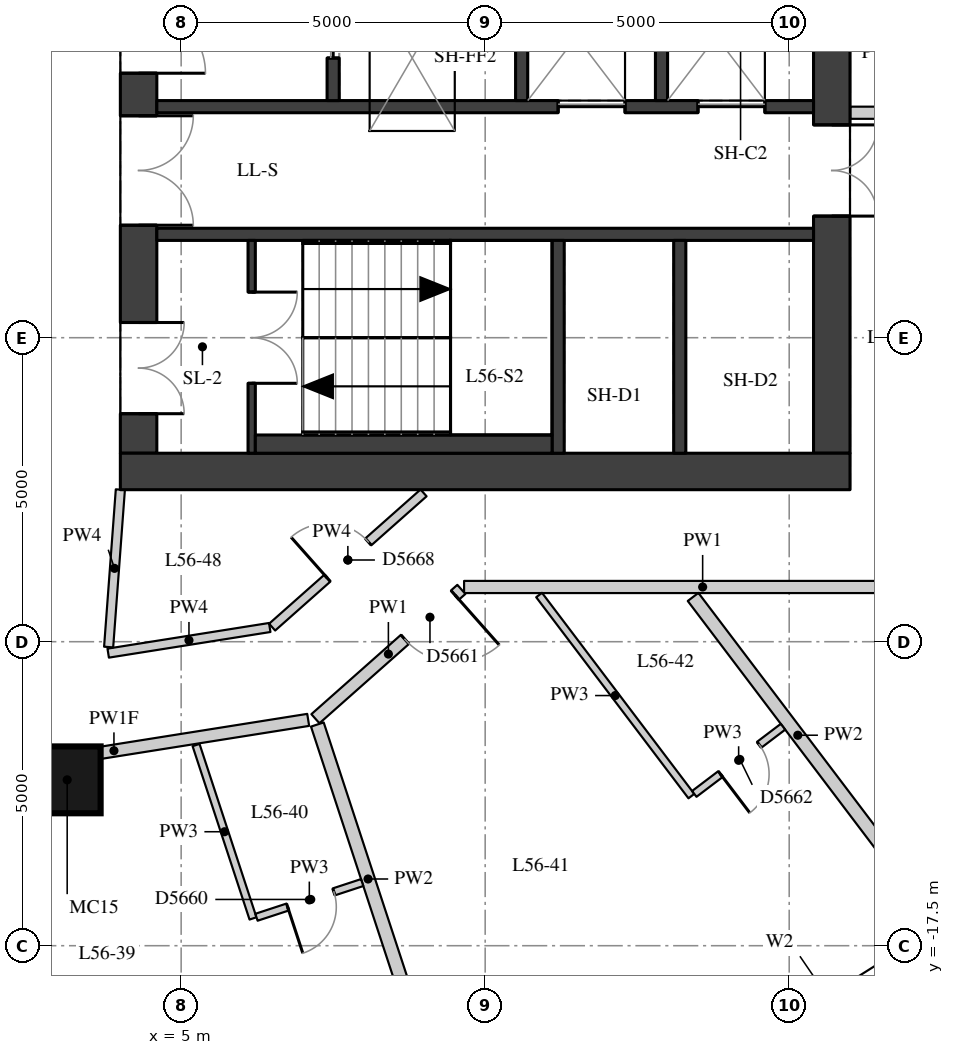
"""IFC4 building model, lengths in metres.
Left out: names, types, materials, properties, quantities, classifications, styles, units other than length and angle.
Written with IfcOpenShell. Run it as: python <this file> out.ifc"""

import sys

from ifc_helpers import new_model, si_unit, direction, frame, frame_2d, origin, origin_2d, place, context, subcontext, project, spatial, rectangle, extrude, element, fill, save


model = new_model("IFC4")
c1 = context("Model", 3, precision=1e-05, world=origin(), true_north=direction((0.0, 1.0)))
c2 = subcontext(c1, "Body", "Model", "MODEL_VIEW")
j1 = project(units=[si_unit("LENGTHUNIT", "METRE"), si_unit("PLANEANGLEUNIT", "RADIAN")], contexts=[c1])
p1 = place(None, origin())
s1 = spatial("IfcSite", under=j1, at=p1, CompositionType="ELEMENT")
p2 = place(p1, origin())
s2 = spatial("IfcBuilding", under=s1, at=p2, CompositionType="ELEMENT")
p3 = place(p2, frame((0.0, 0.0, 199.1)))
s3 = spatial("IfcBuildingStorey", under=s2, at=p3, CompositionType="ELEMENT", Elevation=199.1)
p4 = place(p3, frame((3.126, -14.772, 0.0), z_axis=(0.0, 0.0, 1.0), x_axis=(1.0, 0.0, 0.0)))
e1 = element("IfcColumn", 1, at=p4, inside=s3, PredefinedType="COLUMN", context=c2, shape_type="SweptSolid", body=[
    extrude(rectangle(XDim=1.1, YDim=1.1, at=origin_2d()), origin(), (0.0, 0.0, 1.0), 3.3),
])
p5 = place(p3, frame((14.232, -19.47, 0.0), z_axis=(0.0, 0.0, 1.0), x_axis=(0.84614984472, 0.532945063098, 0.0)))
e2 = element("IfcWall", 2, at=p5, inside=s3, PredefinedType="SOLIDWALL", context=c2, shape_type="SweptSolid", body=[
    extrude(rectangle(XDim=3.586, YDim=0.45, at=frame_2d((1.793, 0.0))), origin(), (0.0, 0.0, 1.0), 3.02),
])
p6 = place(p5, frame((0.793, 0.0, 0.4)))
e3 = element("IfcOpeningElement", 3, at=p6, cuts=e2, PredefinedType="OPENING", context=c2, shape_type="SweptSolid", body=[
    extrude(rectangle(XDim=2.0, YDim=1.75, at=frame_2d((1.0, 0.875))), frame((0.0, 0.235, 0.0), z_axis=(0.0, -1.0, 0.0), x_axis=(1.0, 0.0, 0.0)), (0.0, 0.0, 1.0), 0.47),
])
p7 = place(p3, frame((4.3, -9.4, 0.0), z_axis=(0.0, 0.0, 1.0), x_axis=(0.0, 1.0, 0.0)))
e4 = element("IfcWall", 4, at=p7, inside=s3, PredefinedType="SHEAR", context=c2, shape_type="SweptSolid", body=[
    extrude(rectangle(XDim=18.8, YDim=0.6, at=frame_2d((9.4, 0.0))), origin(), (0.0, 0.0, 1.0), 3.02),
])
p8 = place(p7, frame((0.65, 0.0, 0.0)))
e5 = element("IfcOpeningElement", 5, at=p8, cuts=e4, PredefinedType="OPENING", context=c2, shape_type="SweptSolid", body=[
    extrude(rectangle(XDim=1.5, YDim=2.1, at=frame_2d((0.75, 1.05))), frame((0.0, 0.31, 0.0), z_axis=(0.0, -1.0, 0.0), x_axis=(1.0, 0.0, 0.0)), (0.0, 0.0, 1.0), 0.62),
])
p9 = place(p7, frame((3.75, 0.0, 0.0)))
e6 = element("IfcOpeningElement", 6, at=p9, cuts=e4, PredefinedType="OPENING", context=c2, shape_type="SweptSolid", body=[
    extrude(rectangle(XDim=1.8, YDim=2.1, at=frame_2d((0.9, 1.05))), frame((0.0, 0.31, 0.0), z_axis=(0.0, -1.0, 0.0), x_axis=(1.0, 0.0, 0.0)), (0.0, 0.0, 1.0), 0.62),
])
p10 = place(p7, frame((6.25, 0.0, 0.0)))
e7 = element("IfcOpeningElement", 7, at=p10, cuts=e4, PredefinedType="OPENING", context=c2, shape_type="SweptSolid", body=[
    extrude(rectangle(XDim=1.1, YDim=2.1, at=frame_2d((0.55, 1.05))), frame((0.0, 0.31, 0.0), z_axis=(0.0, -1.0, 0.0), x_axis=(1.0, 0.0, 0.0)), (0.0, 0.0, 1.0), 0.62),
])
p11 = place(p7, frame((8.9, 0.0, 0.0)))
e8 = element("IfcOpeningElement", 8, at=p11, cuts=e4, PredefinedType="OPENING", context=c2, shape_type="SweptSolid", body=[
    extrude(rectangle(XDim=1.0, YDim=2.1, at=frame_2d((0.5, 1.05))), frame((0.0, 0.31, 0.0), z_axis=(0.0, -1.0, 0.0), x_axis=(1.0, 0.0, 0.0)), (0.0, 0.0, 1.0), 0.62),
])
p12 = place(p7, frame((11.45, 0.0, 0.0)))
e9 = element("IfcOpeningElement", 9, at=p12, cuts=e4, PredefinedType="OPENING", context=c2, shape_type="SweptSolid", body=[
    extrude(rectangle(XDim=1.1, YDim=2.1, at=frame_2d((0.55, 1.05))), frame((0.0, 0.31, 0.0), z_axis=(0.0, -1.0, 0.0), x_axis=(1.0, 0.0, 0.0)), (0.0, 0.0, 1.0), 0.62),
])
p13 = place(p7, frame((13.25, 0.0, 0.0)))
e10 = element("IfcOpeningElement", 10, at=p13, cuts=e4, PredefinedType="OPENING", context=c2, shape_type="SweptSolid", body=[
    extrude(rectangle(XDim=1.8, YDim=2.1, at=frame_2d((0.9, 1.05))), frame((0.0, 0.31, 0.0), z_axis=(0.0, -1.0, 0.0), x_axis=(1.0, 0.0, 0.0)), (0.0, 0.0, 1.0), 0.62),
])
p14 = place(p7, frame((16.65, 0.0, 0.0)))
e11 = element("IfcOpeningElement", 11, at=p14, cuts=e4, PredefinedType="OPENING", context=c2, shape_type="SweptSolid", body=[
    extrude(rectangle(XDim=1.5, YDim=2.1, at=frame_2d((0.75, 1.05))), frame((0.0, 0.31, 0.0), z_axis=(0.0, -1.0, 0.0), x_axis=(1.0, 0.0, 0.0)), (0.0, 0.0, 1.0), 0.62),
])
p15 = place(p3, frame((15.7, -9.4, 0.0), z_axis=(0.0, 0.0, 1.0), x_axis=(0.0, 1.0, 0.0)))
e12 = element("IfcWall", 12, at=p15, inside=s3, PredefinedType="SHEAR", context=c2, shape_type="SweptSolid", body=[
    extrude(rectangle(XDim=18.8, YDim=0.6, at=frame_2d((9.4, 0.0))), origin(), (0.0, 0.0, 1.0), 3.02),
])
p16 = place(p15, frame((13.4, 0.0, 0.0)))
e13 = element("IfcOpeningElement", 13, at=p16, cuts=e12, PredefinedType="OPENING", context=c2, shape_type="SweptSolid", body=[
    extrude(rectangle(XDim=1.5, YDim=2.1, at=frame_2d((0.75, 1.05))), frame((0.0, 0.31, 0.0), z_axis=(0.0, -1.0, 0.0), x_axis=(1.0, 0.0, 0.0)), (0.0, 0.0, 1.0), 0.62),
])
p17 = place(p15, frame((3.9, 0.0, 0.0)))
e14 = element("IfcOpeningElement", 14, at=p17, cuts=e12, PredefinedType="OPENING", context=c2, shape_type="SweptSolid", body=[
    extrude(rectangle(XDim=1.5, YDim=2.1, at=frame_2d((0.75, 1.05))), frame((0.0, 0.31, 0.0), z_axis=(0.0, -1.0, 0.0), x_axis=(1.0, 0.0, 0.0)), (0.0, 0.0, 1.0), 0.62),
])
p18 = place(p3, frame((4.0, -9.7, 0.0), z_axis=(0.0, 0.0, 1.0), x_axis=(1.0, 0.0, 0.0)))
e15 = element("IfcWall", 15, at=p18, inside=s3, PredefinedType="SHEAR", context=c2, shape_type="SweptSolid", body=[
    extrude(rectangle(XDim=12.0, YDim=0.6, at=frame_2d((6.0, 0.0))), origin(), (0.0, 0.0, 1.0), 3.02),
])
p19 = place(p3, frame((4.6, -3.7, 0.0), z_axis=(0.0, 0.0, 1.0), x_axis=(1.0, 0.0, 0.0)))
e16 = element("IfcWall", 16, at=p19, inside=s3, PredefinedType="SHEAR", context=c2, shape_type="SweptSolid", body=[
    extrude(rectangle(XDim=10.8, YDim=0.2, at=frame_2d((5.4, 0.0))), origin(), (0.0, 0.0, 1.0), 3.02),
])
p20 = place(p19, frame((6.6, 0.0, 0.0)))
e17 = element("IfcOpeningElement", 17, at=p20, cuts=e16, PredefinedType="OPENING", context=c2, shape_type="SweptSolid", body=[
    extrude(rectangle(XDim=1.1, YDim=2.1, at=frame_2d((0.55, 1.05))), frame((0.0, 0.11, 0.0), z_axis=(0.0, -1.0, 0.0), x_axis=(1.0, 0.0, 0.0)), (0.0, 0.0, 1.0), 0.22),
])
p21 = place(p19, frame((8.9, 0.0, 0.0)))
e18 = element("IfcOpeningElement", 18, at=p21, cuts=e16, PredefinedType="OPENING", context=c2, shape_type="SweptSolid", body=[
    extrude(rectangle(XDim=1.1, YDim=2.1, at=frame_2d((0.55, 1.05))), frame((0.0, 0.11, 0.0), z_axis=(0.0, -1.0, 0.0), x_axis=(1.0, 0.0, 0.0)), (0.0, 0.0, 1.0), 0.22),
])
p22 = place(p3, frame((4.6, -5.8, 0.0), z_axis=(0.0, 0.0, 1.0), x_axis=(1.0, 0.0, 0.0)))
e19 = element("IfcWall", 19, at=p22, inside=s3, PredefinedType="SHEAR", context=c2, shape_type="SweptSolid", body=[
    extrude(rectangle(XDim=10.8, YDim=0.2, at=frame_2d((5.4, 0.0))), origin(), (0.0, 0.0, 1.0), 3.02),
])
for number, where, z_axis, x_axis in (
    (20, (11.2, -9.4, 0.0), (0.0, 0.0, 1.0), (0.0, 1.0, 0.0)),
    (21, (13.2, -9.4, 0.0), (0.0, 0.0, 1.0), (0.0, 1.0, 0.0)),
):
    element("IfcWall", number, at=place(p3, frame(where, z_axis=z_axis, x_axis=x_axis)), inside=s3, PredefinedType="SHEAR", context=c2, shape_type="SweptSolid", body=[
        extrude(rectangle(XDim=3.5, YDim=0.2, at=frame_2d((1.75, 0.0))), origin(), (0.0, 0.0, 1.0), 3.02),
    ])
p23 = place(p3, frame((7.5, -3.6, 0.0), z_axis=(0.0, 0.0, 1.0), x_axis=(0.0, 1.0, 0.0)))
e22 = element("IfcWall", 22, at=p23, inside=s3, PredefinedType="SHEAR", context=c2, shape_type="SweptSolid", body=[
    extrude(rectangle(XDim=2.5, YDim=0.2, at=frame_2d((1.25, 0.0))), origin(), (0.0, 0.0, 1.0), 3.02),
])
p24 = place(p23, frame((0.7, 0.0, 0.0)))
e23 = element("IfcOpeningElement", 23, at=p24, cuts=e22, PredefinedType="OPENING", context=c2, shape_type="SweptSolid", body=[
    extrude(rectangle(XDim=1.1, YDim=2.1, at=frame_2d((0.55, 1.05))), frame((0.0, 0.11, 0.0), z_axis=(0.0, -1.0, 0.0), x_axis=(1.0, 0.0, 0.0)), (0.0, 0.0, 1.0), 0.22),
])
for number, where, z_axis, x_axis in (
    (24, (10.6, -3.6, 0.0), (0.0, 0.0, 1.0), (0.0, 1.0, 0.0)),
    (25, (12.9, -3.6, 0.0), (0.0, 0.0, 1.0), (0.0, 1.0, 0.0)),
):
    element("IfcWall", number, at=place(p3, frame(where, z_axis=z_axis, x_axis=x_axis)), inside=s3, PredefinedType="SHEAR", context=c2, shape_type="SweptSolid", body=[
        extrude(rectangle(XDim=2.5, YDim=0.2, at=frame_2d((1.25, 0.0))), origin(), (0.0, 0.0, 1.0), 3.02),
    ])
p25 = place(p3, frame((6.16, -9.4, 0.0), z_axis=(0.0, 0.0, 1.0), x_axis=(0.0, 1.0, 0.0)))
e26 = element("IfcWall", 26, at=p25, inside=s3, PredefinedType="SHEAR", context=c2, shape_type="SweptSolid", body=[
    extrude(rectangle(XDim=3.5, YDim=0.12, at=frame_2d((1.75, 0.0))), origin(), (0.0, 0.0, 1.0), 3.02),
])
p26 = place(p25, frame((1.15, 0.0, 0.0)))
e27 = element("IfcOpeningElement", 27, at=p26, cuts=e26, PredefinedType="OPENING", context=c2, shape_type="SweptSolid", body=[
    extrude(rectangle(XDim=1.5, YDim=2.1, at=frame_2d((0.75, 1.05))), frame((0.0, 0.07, 0.0), z_axis=(0.0, -1.0, 0.0), x_axis=(1.0, 0.0, 0.0)), (0.0, 0.0, 1.0), 0.14),
])
p27 = place(p3, frame((6.22, -9.25, 0.0), z_axis=(0.0, 0.0, 1.0), x_axis=(1.0, 0.0, 0.0)))
e28 = element("IfcWall", 28, at=p27, inside=s3, PredefinedType="PARTITIONING", context=c2, shape_type="SweptSolid", body=[
    extrude(rectangle(XDim=4.88, YDim=0.3, at=frame_2d((2.44, 0.0))), origin(), (0.0, 0.0, 1.0), 3.02),
])
p28 = place(p3, frame((17.5, -11.6, 0.0), z_axis=(0.0, 0.0, 1.0), x_axis=(-1.0, 0.0, 0.0)))
e29 = element("IfcWall", 29, at=p28, inside=s3, PredefinedType="PARTITIONING", context=c2, shape_type="SweptSolid", body=[
    extrude(rectangle(XDim=7.847, YDim=0.2, at=frame_2d((3.923, 0.0))), origin(), (0.0, 0.0, 1.0), 3.02),
])
p29 = place(p3, frame((9.608, -11.64, 0.0), z_axis=(0.0, 0.0, 1.0), x_axis=(-0.748412200225, -0.663233879227, 0.0)))
e30 = element("IfcWall", 30, at=p29, inside=s3, PredefinedType="PARTITIONING", context=c2, shape_type="SweptSolid", body=[
    extrude(rectangle(XDim=3.207, YDim=0.2, at=frame_2d((1.604, 0.0))), origin(), (0.0, 0.0, 1.0), 3.02),
])
p30 = place(p29, frame((0.14, 0.0, 0.0)))
e31 = element("IfcOpeningElement", 31, at=p30, cuts=e30, PredefinedType="OPENING", context=c2, shape_type="SweptSolid", body=[
    extrude(rectangle(XDim=1.1, YDim=2.1, at=frame_2d((0.55, 1.05))), frame((0.0, 0.11, 0.0), z_axis=(0.0, -1.0, 0.0), x_axis=(1.0, 0.0, 0.0)), (0.0, 0.0, 1.0), 0.22),
])
p31 = place(p3, frame((7.089, -13.786, 0.0), z_axis=(0.0, 0.0, 1.0), x_axis=(-0.987636270411, -0.156762869867, 0.0)))
e32 = element("IfcWall", 32, at=p31, inside=s3, PredefinedType="PARTITIONING", context=c2, shape_type="SweptSolid", body=[
    extrude(rectangle(XDim=6.469, YDim=0.2, at=frame_2d((3.235, 0.0))), origin(), (0.0, 0.0, 1.0), 2.42),
])
p32 = place(p31, frame((5.016, 0.0, 0.0)))
e33 = element("IfcOpeningElement", 33, at=p32, cuts=e32, PredefinedType="OPENING", context=c2, shape_type="SweptSolid", body=[
    extrude(rectangle(XDim=1.1, YDim=2.1, at=frame_2d((0.55, 1.05))), frame((0.0, 0.11, 0.0), z_axis=(0.0, -1.0, 0.0), x_axis=(1.0, 0.0, 0.0)), (0.0, 0.0, 1.0), 0.22),
])
p33 = place(p3, frame((16.004, -3.8, 0.0), z_axis=(0.0, 0.0, 1.0), x_axis=(1.0, 0.0, 0.0)))
e34 = element("IfcWall", 34, at=p33, inside=s3, PredefinedType="PARTITIONING", context=c2, shape_type="SweptSolid", body=[
    extrude(rectangle(XDim=1.596, YDim=0.2, at=frame_2d((0.798, 0.0))), origin(), (0.0, 0.0, 1.0), 2.47),
])
p34 = place(p3, frame((8.987, -10.052, 0.0), z_axis=(0.0, 0.0, 1.0), x_axis=(-0.74833949077, -0.66331591761, 0.0)))
e35 = element("IfcWall", 35, at=p34, inside=s3, PredefinedType="PARTITIONING", context=c2, shape_type="SweptSolid", body=[
    extrude(rectangle(XDim=3.328, YDim=0.15, at=frame_2d((1.664, 0.0))), origin(), (0.0, 0.0, 1.0), 3.02),
])
p35 = place(p34, frame((1.214, 0.0, 0.0)))
e36 = element("IfcOpeningElement", 36, at=p35, cuts=e35, PredefinedType="OPENING", context=c2, shape_type="SweptSolid", body=[
    extrude(rectangle(XDim=0.9, YDim=2.1, at=frame_2d((0.45, 1.05))), frame((0.0, 0.085, 0.0), z_axis=(0.0, -1.0, 0.0), x_axis=(1.0, 0.0, 0.0)), (0.0, 0.0, 1.0), 0.17),
])
p36 = place(p3, frame((6.457, -12.266, 0.0), z_axis=(0.0, 0.0, 1.0), x_axis=(-0.987639766053, -0.156740845063, 0.0)))
e37 = element("IfcWall", 37, at=p36, inside=s3, PredefinedType="PARTITIONING", context=c2, shape_type="SweptSolid", body=[
    extrude(rectangle(XDim=2.69, YDim=0.15, at=frame_2d((1.345, 0.0))), origin(), (0.0, 0.0, 1.0), 3.02),
])
p37 = place(p3, frame((3.807, -12.588, 0.0), z_axis=(0.0, 0.0, 1.0), x_axis=(0.07420077159, 0.997243323114, 0.0)))
e38 = element("IfcWall", 38, at=p37, inside=s3, PredefinedType="PARTITIONING", context=c2, shape_type="SweptSolid", body=[
    extrude(rectangle(XDim=2.596, YDim=0.15, at=frame_2d((1.298, 0.0))), origin(), (0.0, 0.0, 1.0), 3.02),
])
p38 = place(p3, frame((8.908, -18.944, 0.0), z_axis=(0.0, 0.0, 1.0), x_axis=(-0.311910788491, 0.950111393481, 0.0)))
e39 = element("IfcWall", 39, at=p38, inside=s3, PredefinedType="PARTITIONING", context=c2, shape_type="SweptSolid", body=[
    extrude(rectangle(XDim=5.348, YDim=0.22, at=frame_2d((2.674, 0.0))), origin(), (0.0, 0.0, 1.0), 3.02),
])
p39 = place(p3, frame((16.863, -16.312, 0.0), z_axis=(0.0, 0.0, 1.0), x_axis=(-0.603636051313, 0.797260006243, 0.0)))
e40 = element("IfcWall", 40, at=p39, inside=s3, PredefinedType="PARTITIONING", context=c2, shape_type="SweptSolid", body=[
    extrude(rectangle(XDim=5.706, YDim=0.22, at=frame_2d((2.853, 0.0))), origin(), (0.0, 0.0, 1.0), 3.02),
])
p40 = place(p3, frame((5.245, -14.2, 0.0), z_axis=(0.0, 0.0, 1.0), x_axis=(0.31202743032, -0.950073093361, 0.0)))
e41 = element("IfcWall", 41, at=p40, inside=s3, PredefinedType="PARTITIONING", context=c2, shape_type="SweptSolid", body=[
    extrude(rectangle(XDim=3.001, YDim=0.12, at=frame_2d((1.501, 0.0))), origin(), (0.0, 0.0, 1.0), 3.02),
])
p41 = place(p3, frame((10.887, -11.732, 0.0), z_axis=(0.0, 0.0, 1.0), x_axis=(0.603646932038, -0.797251767913, 0.0)))
e42 = element("IfcWall", 42, at=p41, inside=s3, PredefinedType="PARTITIONING", context=c2, shape_type="SweptSolid", body=[
    extrude(rectangle(XDim=4.149, YDim=0.12, at=frame_2d((2.074, 0.0))), origin(), (0.0, 0.0, 1.0), 3.02),
])
p42 = place(p3, frame((6.239, -17.032, 0.0), z_axis=(0.0, 0.0, 1.0), x_axis=(0.950127811882, 0.311860771962, 0.0)))
e43 = element("IfcWall", 43, at=p42, inside=s3, PredefinedType="PARTITIONING", context=c2, shape_type="SweptSolid", body=[
    extrude(rectangle(XDim=1.83, YDim=0.12, at=frame_2d((0.915, 0.0))), origin(), (0.0, 0.0, 1.0), 3.02),
])
p43 = place(p42, frame((0.54, 0.0, 0.0)))
e44 = element("IfcOpeningElement", 44, at=p43, cuts=e43, PredefinedType="OPENING", context=c2, shape_type="SweptSolid", body=[
    extrude(rectangle(XDim=0.8, YDim=2.1, at=frame_2d((0.4, 1.05))), frame((0.0, 0.07, 0.0), z_axis=(0.0, -1.0, 0.0), x_axis=(1.0, 0.0, 0.0)), (0.0, 0.0, 1.0), 0.14),
])
p44 = place(p3, frame((13.439, -15.003, 0.0), z_axis=(0.0, 0.0, 1.0), x_axis=(0.797238062708, 0.603665032422, 0.0)))
e45 = element("IfcWall", 45, at=p44, inside=s3, PredefinedType="PARTITIONING", context=c2, shape_type="SweptSolid", body=[
    extrude(rectangle(XDim=1.83, YDim=0.12, at=frame_2d((0.915, 0.0))), origin(), (0.0, 0.0, 1.0), 3.02),
])
p45 = place(p44, frame((0.54, 0.0, 0.0)))
e46 = element("IfcOpeningElement", 46, at=p45, cuts=e45, PredefinedType="OPENING", context=c2, shape_type="SweptSolid", body=[
    extrude(rectangle(XDim=0.8, YDim=2.1, at=frame_2d((0.4, 1.05))), frame((0.0, 0.07, 0.0), z_axis=(0.0, -1.0, 0.0), x_axis=(1.0, 0.0, 0.0)), (0.0, 0.0, 1.0), 0.14),
])
p46 = place(p6, origin())
e47 = element("IfcWindow", 47, at=p46, inside=s3, PartitioningType="SINGLE_PANEL", PredefinedType="WINDOW", context=c2, shape_type="SweptSolid", body=[
    extrude(rectangle(XDim=2.0, YDim=1.75, at=frame_2d((1.0, 0.875))), frame((0.0, 0.035, 0.0), z_axis=(0.0, -1.0, 0.0), x_axis=(1.0, 0.0, 0.0)), (0.0, 0.0, 1.0), 0.06),
])
fill(e3, e47)
p47 = place(p8, origin())
e48 = element("IfcDoor", 48, at=p47, inside=s3, OperationType="DOUBLE_DOOR_SINGLE_SWING", PredefinedType="DOOR", context=c2, shape_type="SweptSolid", body=[
    extrude(rectangle(XDim=1.5, YDim=2.1, at=frame_2d((0.75, 1.05))), frame((0.0, 0.025, 0.0), z_axis=(0.0, -1.0, 0.0), x_axis=(1.0, 0.0, 0.0)), (0.0, 0.0, 1.0), 0.05),
])
fill(e5, e48)
p48 = place(p9, origin())
e49 = element("IfcDoor", 49, at=p48, inside=s3, OperationType="DOUBLE_DOOR_SINGLE_SWING", PredefinedType="DOOR", context=c2, shape_type="SweptSolid", body=[
    extrude(rectangle(XDim=1.8, YDim=2.1, at=frame_2d((0.9, 1.05))), frame((0.0, 0.025, 0.0), z_axis=(0.0, -1.0, 0.0), x_axis=(1.0, 0.0, 0.0)), (0.0, 0.0, 1.0), 0.05),
])
fill(e6, e49)
p49 = place(p10, origin())
e50 = element("IfcDoor", 50, at=p49, inside=s3, OperationType="SINGLE_SWING_RIGHT", PredefinedType="DOOR", context=c2, shape_type="SweptSolid", body=[
    extrude(rectangle(XDim=1.1, YDim=2.1, at=frame_2d((0.55, 1.05))), frame((0.0, 0.025, 0.0), z_axis=(0.0, -1.0, 0.0), x_axis=(1.0, 0.0, 0.0)), (0.0, 0.0, 1.0), 0.05),
])
fill(e7, e50)
p50 = place(p17, origin())
e51 = element("IfcDoor", 51, at=p50, inside=s3, OperationType="DOUBLE_DOOR_SINGLE_SWING", PredefinedType="DOOR", context=c2, shape_type="SweptSolid", body=[
    extrude(rectangle(XDim=1.5, YDim=2.1, at=frame_2d((0.75, 1.05))), frame((0.0, 0.025, 0.0), z_axis=(0.0, -1.0, 0.0), x_axis=(1.0, 0.0, 0.0)), (0.0, 0.0, 1.0), 0.05),
])
fill(e14, e51)
p51 = place(p26, origin())
e52 = element("IfcDoor", 52, at=p51, inside=s3, OperationType="DOUBLE_DOOR_SINGLE_SWING", PredefinedType="DOOR", context=c2, shape_type="SweptSolid", body=[
    extrude(rectangle(XDim=1.5, YDim=2.1, at=frame_2d((0.75, 1.05))), frame((0.0, 0.025, 0.0), z_axis=(0.0, -1.0, 0.0), x_axis=(1.0, 0.0, 0.0)), (0.0, 0.0, 1.0), 0.05),
])
fill(e27, e52)
p52 = place(p20, origin())
e53 = element("IfcDoor", 53, at=p52, inside=s3, OperationType="DOUBLE_DOOR_SLIDING", PredefinedType="DOOR", context=c2, shape_type="SweptSolid", body=[
    extrude(rectangle(XDim=1.1, YDim=2.1, at=frame_2d((0.55, 1.05))), frame((0.0, 0.025, 0.0), z_axis=(0.0, -1.0, 0.0), x_axis=(1.0, 0.0, 0.0)), (0.0, 0.0, 1.0), 0.05),
])
fill(e17, e53)
p53 = place(p21, origin())
e54 = element("IfcDoor", 54, at=p53, inside=s3, OperationType="DOUBLE_DOOR_SLIDING", PredefinedType="DOOR", context=c2, shape_type="SweptSolid", body=[
    extrude(rectangle(XDim=1.1, YDim=2.1, at=frame_2d((0.55, 1.05))), frame((0.0, 0.025, 0.0), z_axis=(0.0, -1.0, 0.0), x_axis=(1.0, 0.0, 0.0)), (0.0, 0.0, 1.0), 0.05),
])
fill(e18, e54)
p54 = place(p24, origin())
e55 = element("IfcDoor", 55, at=p54, inside=s3, OperationType="DOUBLE_DOOR_SLIDING", PredefinedType="DOOR", context=c2, shape_type="SweptSolid", body=[
    extrude(rectangle(XDim=1.1, YDim=2.1, at=frame_2d((0.55, 1.05))), frame((0.0, 0.025, 0.0), z_axis=(0.0, -1.0, 0.0), x_axis=(1.0, 0.0, 0.0)), (0.0, 0.0, 1.0), 0.05),
])
fill(e23, e55)
p55 = place(p43, origin())
e56 = element("IfcDoor", 56, at=p55, inside=s3, OperationType="SINGLE_SWING_RIGHT", PredefinedType="DOOR", context=c2, shape_type="SweptSolid", body=[
    extrude(rectangle(XDim=0.8, YDim=2.1, at=frame_2d((0.4, 1.05))), frame((0.0, 0.025, 0.0), z_axis=(0.0, -1.0, 0.0), x_axis=(1.0, 0.0, 0.0)), (0.0, 0.0, 1.0), 0.05),
])
fill(e44, e56)
p56 = place(p30, origin())
e57 = element("IfcDoor", 57, at=p56, inside=s3, OperationType="SINGLE_SWING_LEFT", PredefinedType="DOOR", context=c2, shape_type="SweptSolid", body=[
    extrude(rectangle(XDim=1.1, YDim=2.1, at=frame_2d((0.55, 1.05))), frame((0.0, 0.025, 0.0), z_axis=(0.0, -1.0, 0.0), x_axis=(1.0, 0.0, 0.0)), (0.0, 0.0, 1.0), 0.05),
])
fill(e31, e57)
p57 = place(p45, origin())
e58 = element("IfcDoor", 58, at=p57, inside=s3, OperationType="SINGLE_SWING_RIGHT", PredefinedType="DOOR", context=c2, shape_type="SweptSolid", body=[
    extrude(rectangle(XDim=0.8, YDim=2.1, at=frame_2d((0.4, 1.05))), frame((0.0, 0.025, 0.0), z_axis=(0.0, -1.0, 0.0), x_axis=(1.0, 0.0, 0.0)), (0.0, 0.0, 1.0), 0.05),
])
fill(e46, e58)
p58 = place(p35, origin())
e59 = element("IfcDoor", 59, at=p58, inside=s3, OperationType="SINGLE_SWING_LEFT", PredefinedType="DOOR", context=c2, shape_type="SweptSolid", body=[
    extrude(rectangle(XDim=0.9, YDim=2.1, at=frame_2d((0.45, 1.05))), frame((0.0, 0.025, 0.0), z_axis=(0.0, -1.0, 0.0), x_axis=(1.0, 0.0, 0.0)), (0.0, 0.0, 1.0), 0.05),
])
fill(e36, e59)
save(model, sys.argv[1])
